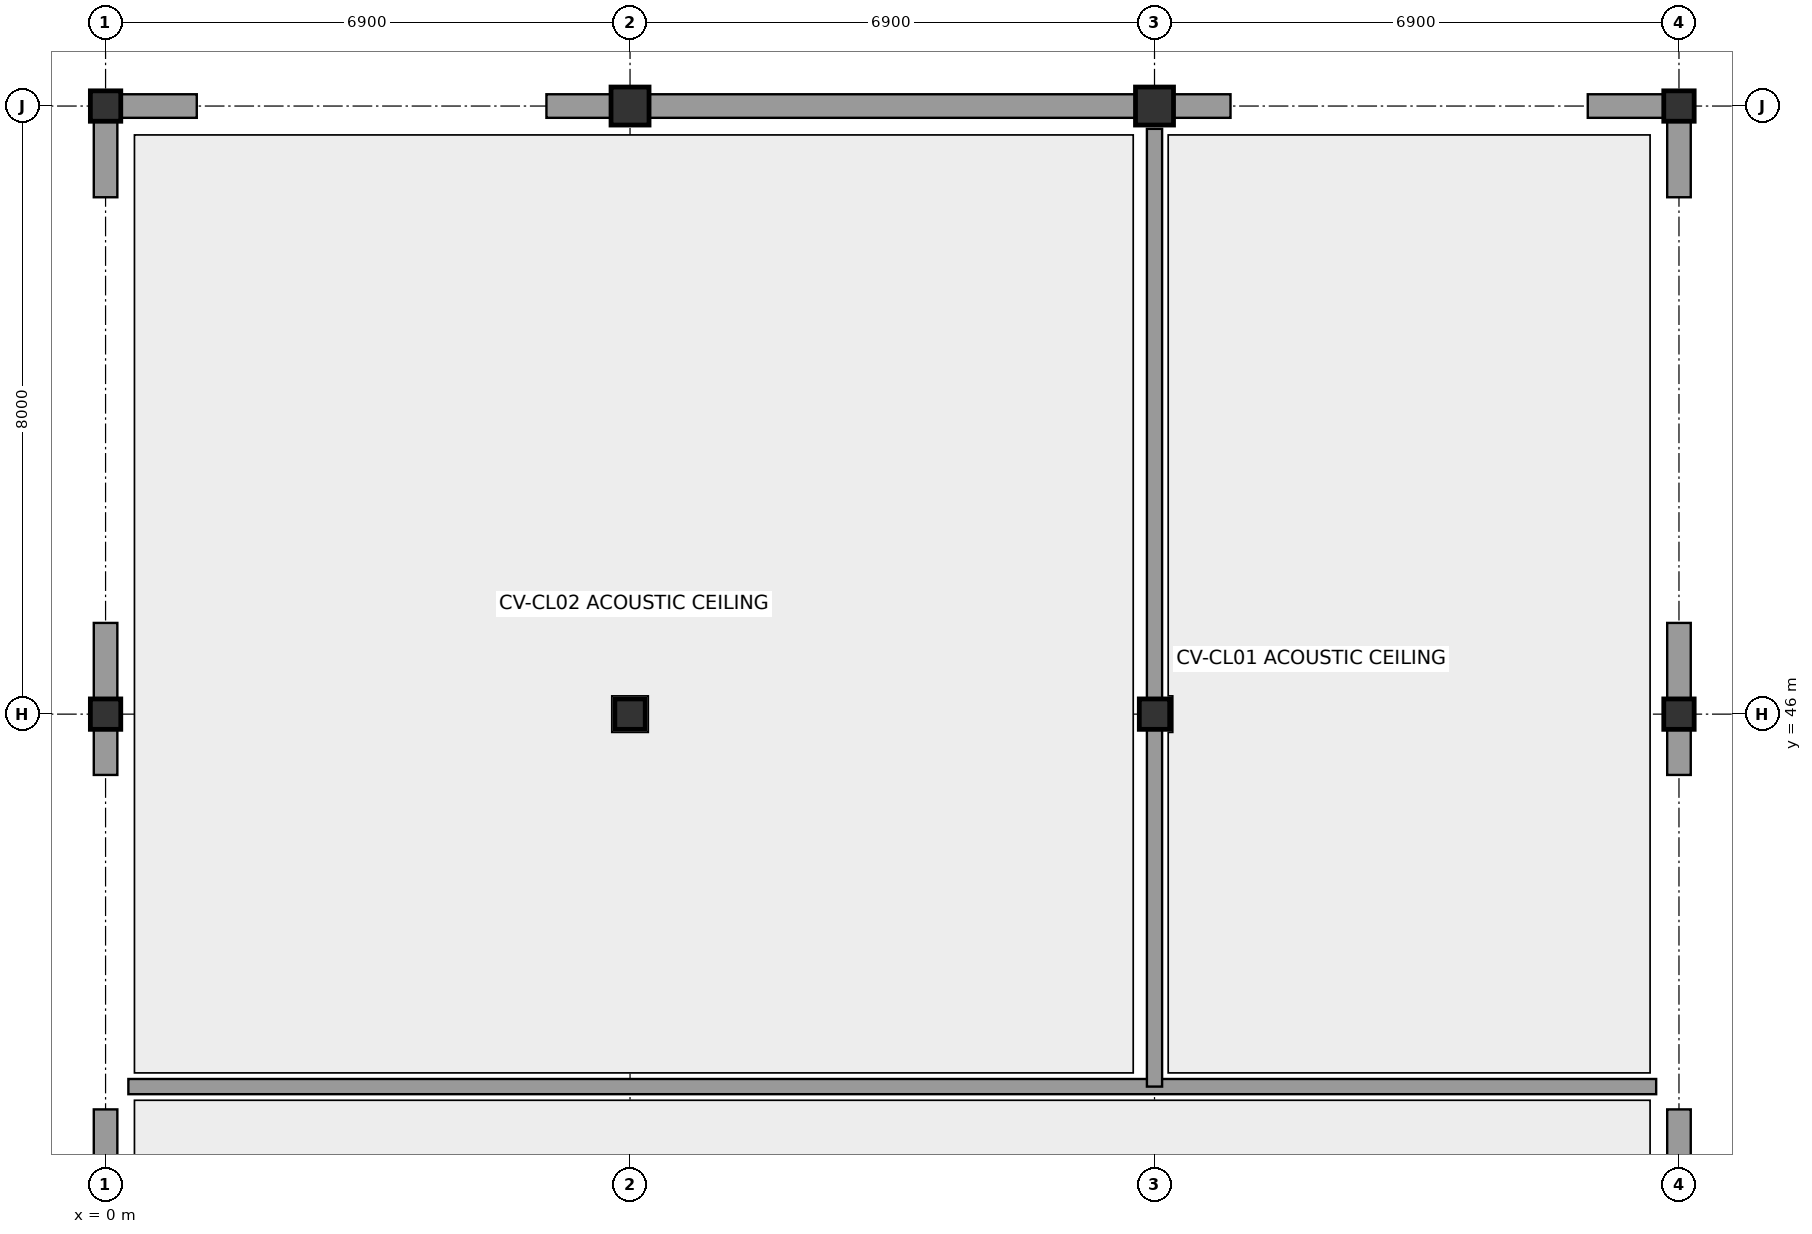
"""IFC4 building model, lengths in metres.
Left out: names, types, materials, properties, quantities, classifications, styles, units other than length and angle.
Written with IfcOpenShell. Run it as: python <this file> out.ifc"""

import sys

from ifc_helpers import new_model, si_unit, direction, frame, frame_2d, origin, origin_with_axes, origin_2d, place, context, subcontext, project, spatial, rectangle, circle, extrude, element, fill, save


model = new_model("IFC4")
c1 = context("Model", 3, precision=1e-05, world=origin(), true_north=direction((0.0, 1.0)))
c2 = subcontext(c1, "Body", "Model", "MODEL_VIEW")
j1 = project(units=[si_unit("LENGTHUNIT", "METRE"), si_unit("PLANEANGLEUNIT", "RADIAN")], contexts=[c1])
p1 = place(None, origin())
s1 = spatial("IfcSite", under=j1, at=p1, CompositionType="ELEMENT")
p2 = place(p1, origin())
s2 = spatial("IfcBuilding", under=s1, at=p2, CompositionType="ELEMENT")
p3 = place(p2, origin())
s3 = spatial("IfcBuildingStorey", under=s2, at=p3, CompositionType="ELEMENT", Elevation=0.0)
for number, where, z_axis, x_axis in (
    (1, (0.0, 46.0, 0.0), (0.0, 0.0, 1.0), (1.0, 0.0, 0.0)),
    (2, (0.0, 54.0, 0.0), (0.0, 0.0, 1.0), (1.0, 0.0, 0.0)),
    (3, (6.9, 46.0, 0.0), (0.0, 0.0, 1.0), (1.0, 0.0, 0.0)),
):
    element("IfcColumn", number, at=place(p3, frame(where, z_axis=z_axis, x_axis=x_axis)), inside=s3, PredefinedType="COLUMN", context=c2, shape_type="SweptSolid", body=[
        extrude(rectangle(XDim=0.4, YDim=0.4, at=origin_2d()), origin(), (0.0, 0.0, 1.0), 4.4),
    ])
p4 = place(p3, frame((6.9, 54.0, 0.0), z_axis=(0.0, 0.0, 1.0), x_axis=(1.0, 0.0, 0.0)))
e4 = element("IfcColumn", 4, at=p4, inside=s3, PredefinedType="COLUMN", context=c2, shape_type="SweptSolid", body=[
    extrude(circle(Radius=0.25, at=origin_2d()), origin(), (0.0, 0.0, 1.0), 4.4),
])
p5 = place(p3, frame((13.8, 46.0, 0.0), z_axis=(0.0, 0.0, 1.0), x_axis=(1.0, 0.0, 0.0)))
e5 = element("IfcColumn", 5, at=p5, inside=s3, PredefinedType="COLUMN", context=c2, shape_type="SweptSolid", body=[
    extrude(rectangle(XDim=0.4, YDim=0.4, at=origin_2d()), origin(), (0.0, 0.0, 1.0), 4.4),
])
p6 = place(p3, frame((13.8, 54.0, 0.0), z_axis=(0.0, 0.0, 1.0), x_axis=(1.0, 0.0, 0.0)))
e6 = element("IfcColumn", 6, at=p6, inside=s3, PredefinedType="COLUMN", context=c2, shape_type="SweptSolid", body=[
    extrude(circle(Radius=0.25, at=origin_2d()), origin(), (0.0, 0.0, 1.0), 4.4),
])
for number, where, z_axis, x_axis in (
    (7, (20.7, 46.0, 0.0), (0.0, 0.0, 1.0), (1.0, 0.0, 0.0)),
    (8, (20.7, 54.0, 0.0), (0.0, 0.0, 1.0), (1.0, 0.0, 0.0)),
):
    element("IfcColumn", number, at=place(p3, frame(where, z_axis=z_axis, x_axis=x_axis)), inside=s3, PredefinedType="COLUMN", context=c2, shape_type="SweptSolid", body=[
        extrude(rectangle(XDim=0.4, YDim=0.4, at=origin_2d()), origin(), (0.0, 0.0, 1.0), 4.4),
    ])
p7 = place(p3, frame((0.0, 36.4, 0.0), z_axis=(0.0, 0.0, 1.0), x_axis=(0.0, 1.0, 0.0)))
e9 = element("IfcWall", 9, at=p7, inside=s3, PredefinedType="STANDARD", context=c2, shape_type="SweptSolid", body=[
    extrude(rectangle(XDim=4.4, YDim=0.31, at=frame_2d((2.2, 0.0))), origin(), (0.0, 0.0, 1.0), 3.56),
])
p8 = place(p7, frame((2.4, 0.0, 0.0)))
e10 = element("IfcOpeningElement", 10, at=p8, cuts=e9, PredefinedType="OPENING", context=c2, shape_type="SweptSolid", body=[
    extrude(rectangle(XDim=1.5, YDim=2.2, at=frame_2d((0.75, 1.1))), frame((0.0, 0.167, 0.0), z_axis=(0.0, -1.0, 0.0), x_axis=(1.0, 0.0, 0.0)), (0.0, 0.0, 1.0), 0.334),
])
p9 = place(p3, frame((0.0, 45.2, 0.0), z_axis=(0.0, 0.0, 1.0), x_axis=(0.0, 1.0, 0.0)))
e11 = element("IfcWall", 11, at=p9, inside=s3, PredefinedType="STANDARD", context=c2, shape_type="SweptSolid", body=[
    extrude(rectangle(XDim=2.0, YDim=0.31, at=frame_2d((1.0, 0.0))), origin(), (0.0, 0.0, 1.0), 3.56),
])
p10 = place(p3, frame((0.0, 52.8, 0.0), z_axis=(0.0, 0.0, 1.0), x_axis=(0.0, 1.0, 0.0)))
e12 = element("IfcWall", 12, at=p10, inside=s3, PredefinedType="STANDARD", context=c2, shape_type="SweptSolid", body=[
    extrude(rectangle(XDim=1.2, YDim=0.31, at=frame_2d((0.6, 0.0))), origin(), (0.0, 0.0, 1.0), 3.56),
])
p11 = place(p3, frame((20.7, 36.4, 0.0), z_axis=(0.0, 0.0, 1.0), x_axis=(0.0, 1.0, 0.0)))
e13 = element("IfcWall", 13, at=p11, inside=s3, PredefinedType="STANDARD", context=c2, shape_type="SweptSolid", body=[
    extrude(rectangle(XDim=4.4, YDim=0.31, at=frame_2d((2.2, 0.0))), origin(), (0.0, 0.0, 1.0), 3.56),
])
p12 = place(p3, frame((20.7, 45.2, 0.0), z_axis=(0.0, 0.0, 1.0), x_axis=(0.0, 1.0, 0.0)))
e14 = element("IfcWall", 14, at=p12, inside=s3, PredefinedType="STANDARD", context=c2, shape_type="SweptSolid", body=[
    extrude(rectangle(XDim=2.0, YDim=0.31, at=frame_2d((1.0, 0.0))), origin(), (0.0, 0.0, 1.0), 3.56),
])
p13 = place(p3, frame((20.7, 52.8, 0.0), z_axis=(0.0, 0.0, 1.0), x_axis=(0.0, 1.0, 0.0)))
e15 = element("IfcWall", 15, at=p13, inside=s3, PredefinedType="STANDARD", context=c2, shape_type="SweptSolid", body=[
    extrude(rectangle(XDim=1.2, YDim=0.31, at=frame_2d((0.6, 0.0))), origin(), (0.0, 0.0, 1.0), 3.56),
])
p14 = place(p3, frame((0.0, 54.0, 0.0), z_axis=(0.0, 0.0, 1.0), x_axis=(1.0, 0.0, 0.0)))
e16 = element("IfcWall", 16, at=p14, inside=s3, PredefinedType="STANDARD", context=c2, shape_type="SweptSolid", body=[
    extrude(rectangle(XDim=1.2, YDim=0.31, at=frame_2d((0.6, 0.0))), origin(), (0.0, 0.0, 1.0), 3.36),
])
p15 = place(p3, frame((5.8, 54.0, 0.0), z_axis=(0.0, 0.0, 1.0), x_axis=(1.0, 0.0, 0.0)))
e17 = element("IfcWall", 17, at=p15, inside=s3, PredefinedType="STANDARD", context=c2, shape_type="SweptSolid", body=[
    extrude(rectangle(XDim=9.0, YDim=0.31, at=frame_2d((4.5, 0.0))), origin(), (0.0, 0.0, 1.0), 3.36),
])
p16 = place(p15, frame((3.8, 0.0, 0.0)))
e18 = element("IfcOpeningElement", 18, at=p16, cuts=e17, PredefinedType="OPENING", context=c2, shape_type="SweptSolid", body=[
    extrude(rectangle(XDim=1.5, YDim=2.2, at=frame_2d((0.75, 1.1))), frame((0.0, 0.167, 0.0), z_axis=(0.0, -1.0, 0.0), x_axis=(1.0, 0.0, 0.0)), (0.0, 0.0, 1.0), 0.334),
])
p17 = place(p3, frame((19.5, 54.0, 0.0), z_axis=(0.0, 0.0, 1.0), x_axis=(1.0, 0.0, 0.0)))
e19 = element("IfcWall", 19, at=p17, inside=s3, PredefinedType="STANDARD", context=c2, shape_type="SweptSolid", body=[
    extrude(rectangle(XDim=1.2, YDim=0.31, at=frame_2d((0.6, 0.0))), origin(), (0.0, 0.0, 1.0), 3.36),
])
p18 = place(p3, frame((0.3, 41.1, 0.0), z_axis=(0.0, 0.0, 1.0), x_axis=(1.0, 0.0, 0.0)))
e20 = element("IfcWall", 20, at=p18, inside=s3, PredefinedType="PARTITIONING", context=c2, shape_type="SweptSolid", body=[
    extrude(rectangle(XDim=20.1, YDim=0.2, at=frame_2d((10.05, 0.0))), origin(), (0.0, 0.0, 1.0), 4.12),
])
p19 = place(p18, frame((2.4, 0.0, 0.0)))
e21 = element("IfcOpeningElement", 21, at=p19, cuts=e20, PredefinedType="OPENING", context=c2, shape_type="SweptSolid", body=[
    extrude(rectangle(XDim=1.5, YDim=2.2, at=frame_2d((0.75, 1.1))), frame((0.0, 0.112, 0.0), z_axis=(0.0, -1.0, 0.0), x_axis=(1.0, 0.0, 0.0)), (0.0, 0.0, 1.0), 0.224),
])
p20 = place(p18, frame((15.6, 0.0, 0.0)))
e22 = element("IfcOpeningElement", 22, at=p20, cuts=e20, PredefinedType="OPENING", context=c2, shape_type="SweptSolid", body=[
    extrude(rectangle(XDim=1.0, YDim=2.15, at=frame_2d((0.5, 1.075))), frame((0.0, 0.112, 0.0), z_axis=(0.0, -1.0, 0.0), x_axis=(1.0, 0.0, 0.0)), (0.0, 0.0, 1.0), 0.224),
])
p21 = place(p3, frame((13.8, 41.1, 0.0), z_axis=(0.0, 0.0, 1.0), x_axis=(0.0, 1.0, 0.0)))
e23 = element("IfcWall", 23, at=p21, inside=s3, PredefinedType="PARTITIONING", context=c2, shape_type="SweptSolid", body=[
    extrude(rectangle(XDim=12.6, YDim=0.2, at=frame_2d((6.3, 0.0))), origin(), (0.0, 0.0, 1.0), 4.12),
])
p22 = place(p8, origin_with_axes())
e24 = element("IfcDoor", 24, at=p22, inside=s3, OperationType="DOUBLE_DOOR_SINGLE_SWING", PredefinedType="DOOR", context=c2, shape_type="SweptSolid", body=[
    extrude(rectangle(XDim=1.5, YDim=2.2, at=frame_2d((0.75, 1.1))), frame((0.0, 0.025, 0.0), z_axis=(0.0, -1.0, 0.0), x_axis=(1.0, 0.0, 0.0)), (0.0, 0.0, 1.0), 0.05),
])
fill(e10, e24)
p23 = place(p16, origin_with_axes())
e25 = element("IfcDoor", 25, at=p23, inside=s3, OperationType="DOUBLE_DOOR_SINGLE_SWING", PredefinedType="DOOR", context=c2, shape_type="SweptSolid", body=[
    extrude(rectangle(XDim=1.5, YDim=2.2, at=frame_2d((0.75, 1.1))), frame((0.0, 0.025, 0.0), z_axis=(0.0, -1.0, 0.0), x_axis=(1.0, 0.0, 0.0)), (0.0, 0.0, 1.0), 0.05),
])
fill(e18, e25)
p24 = place(p19, origin_with_axes())
e26 = element("IfcDoor", 26, at=p24, inside=s3, OperationType="DOUBLE_DOOR_SINGLE_SWING", PredefinedType="DOOR", context=c2, shape_type="SweptSolid", body=[
    extrude(rectangle(XDim=1.5, YDim=2.2, at=frame_2d((0.75, 1.1))), frame((0.0, 0.025, 0.0), z_axis=(0.0, -1.0, 0.0), x_axis=(1.0, 0.0, 0.0)), (0.0, 0.0, 1.0), 0.05),
])
fill(e21, e26)
p25 = place(p20, frame((1.0, 0.0, 0.0), z_axis=(0.0, 0.0, 1.0), x_axis=(-1.0, 0.0, 0.0)))
e27 = element("IfcDoor", 27, at=p25, inside=s3, OperationType="SINGLE_SWING_LEFT", PredefinedType="DOOR", context=c2, shape_type="SweptSolid", body=[
    extrude(rectangle(XDim=1.0, YDim=2.15, at=frame_2d((0.5, 1.075))), frame((0.0, 0.025, 0.0), z_axis=(0.0, -1.0, 0.0), x_axis=(1.0, 0.0, 0.0)), (0.0, 0.0, 1.0), 0.05),
])
fill(e22, e27)
save(model, sys.argv[1])
